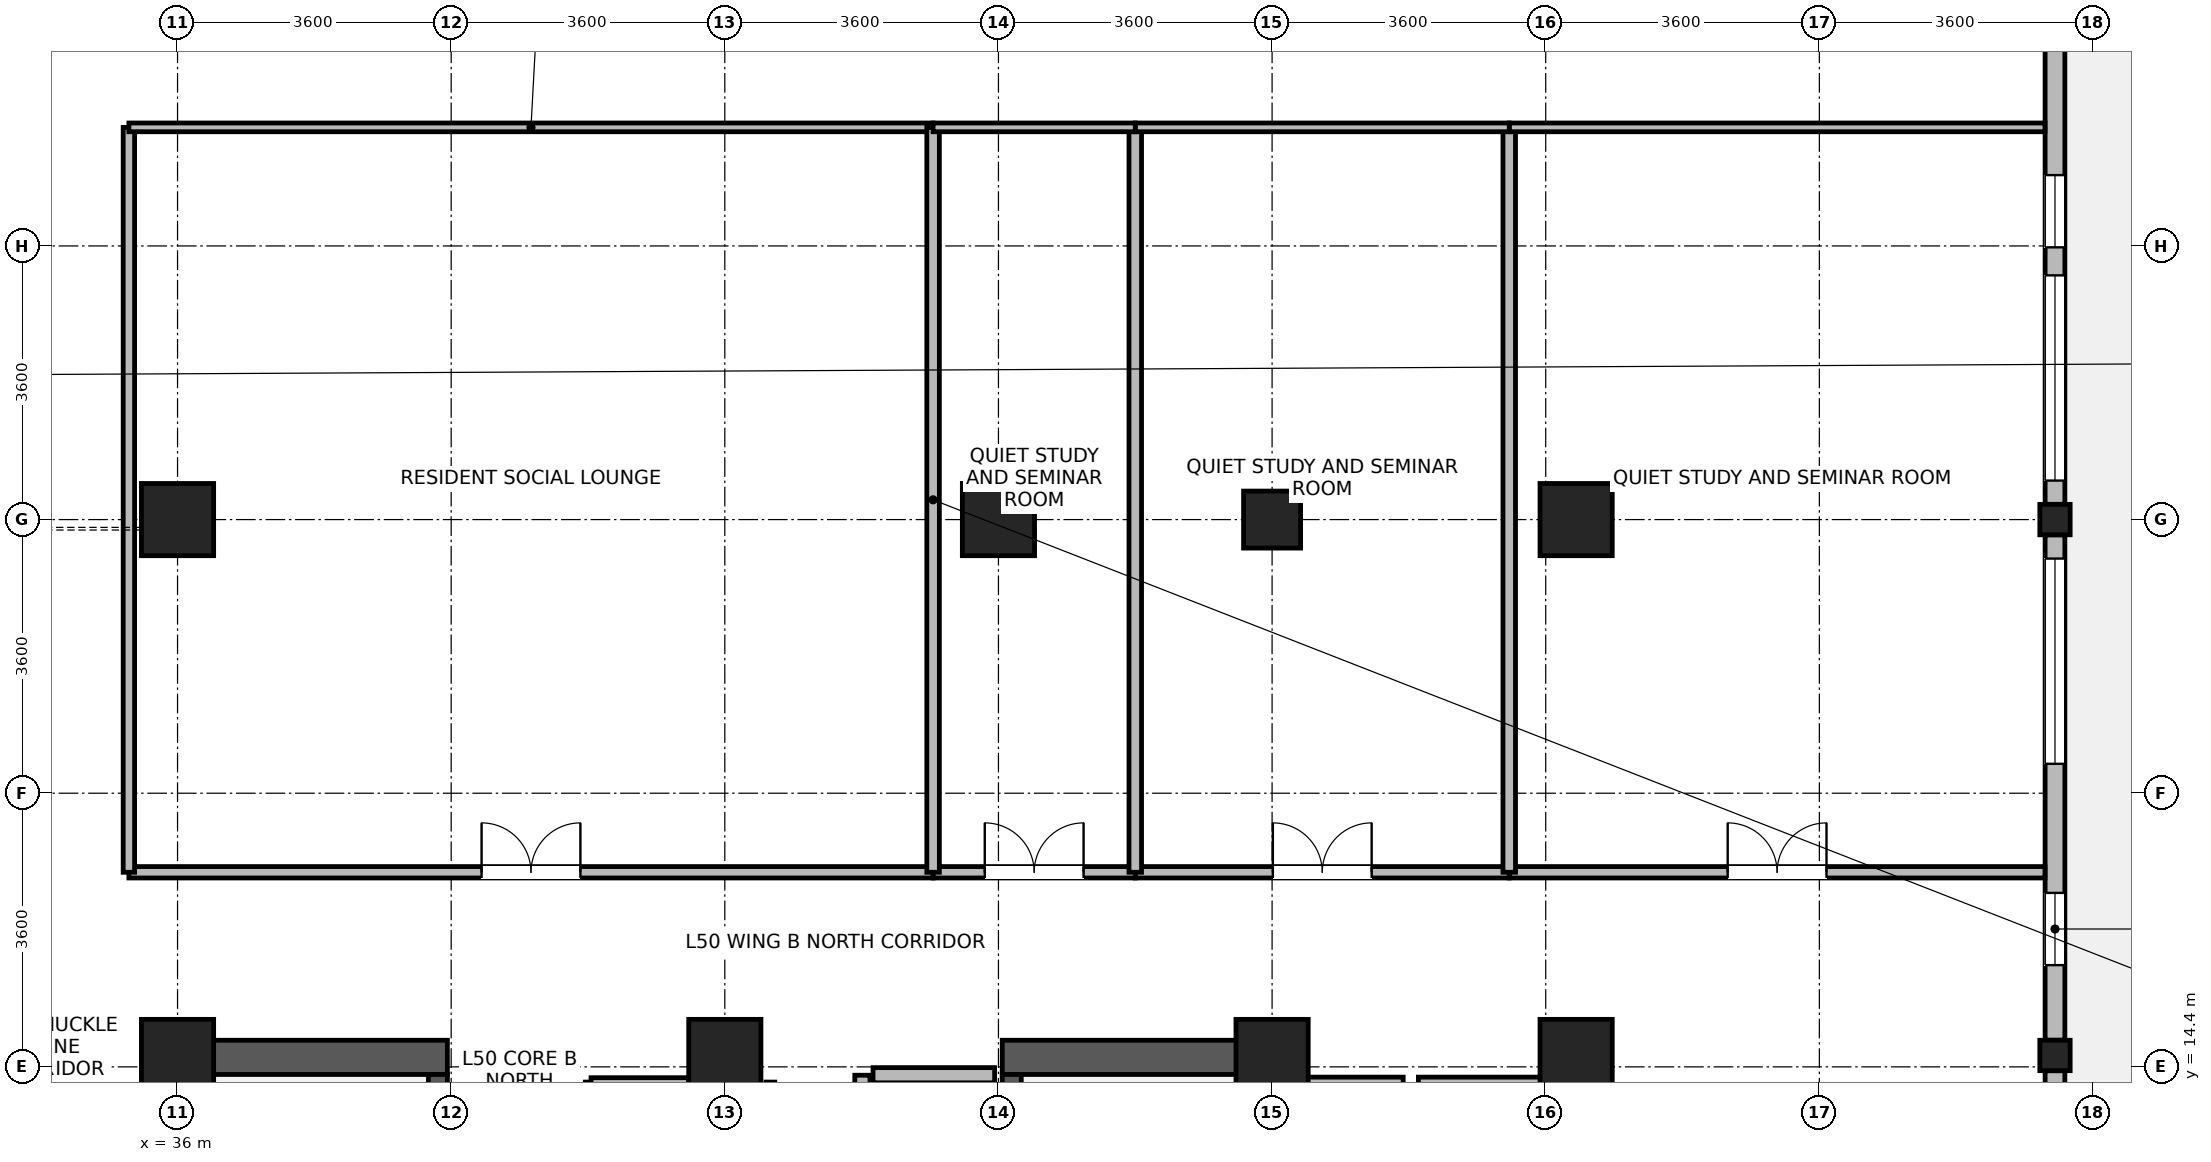
"""IFC4 building model, lengths in metres.
Left out: names, types, materials, properties, quantities, classifications, styles, units other than length and angle.
Written with IfcOpenShell. Run it as: python <this file> out.ifc"""

import sys

from ifc_helpers import new_model, si_unit, direction, frame, frame_2d, origin, origin_2d, place, context, subcontext, project, spatial, rectangle, i_section, extrude, source, transform, mapped, element, fill, save


model = new_model("IFC4")
c1 = context("Model", 3, precision=1e-05, world=origin(), true_north=direction((0.0, 1.0)))
c2 = subcontext(c1, "Body", "Model", "MODEL_VIEW")
j1 = project(units=[si_unit("LENGTHUNIT", "METRE"), si_unit("PLANEANGLEUNIT", "RADIAN")], contexts=[c1])
p1 = place(None, origin())
s1 = spatial("IfcSite", under=j1, at=p1, CompositionType="ELEMENT")
p2 = place(p1, origin())
s2 = spatial("IfcBuilding", under=s1, at=p2, CompositionType="ELEMENT")
p3 = place(p2, frame((0.0, 0.0, 197.2)))
s3 = spatial("IfcBuildingStorey", under=s2, at=p3, CompositionType="ELEMENT", Elevation=197.2)
for number, where, z_axis, x_axis in (
    (1, (36.125, 6.85, 0.0), (0.0, 0.0, 1.0), (0.0, 1.0, 0.0)),
    (2, (50.275, 6.85, 0.0), (0.0, 0.0, 1.0), (0.0, 1.0, 0.0)),
):
    element("IfcWall", number, at=place(p3, frame(where, z_axis=z_axis, x_axis=x_axis)), inside=s3, PredefinedType="SHEAR", context=c2, shape_type="SweptSolid", body=[
        extrude(rectangle(XDim=7.9, YDim=0.45, at=frame_2d((3.95, 0.0))), origin(), (0.0, 0.0, 1.0), 4.37),
    ])
for number, where, z_axis, x_axis in (
    (3, (36.35, 14.525, 0.0), (0.0, 0.0, 1.0), (1.0, 0.0, 0.0)),
    (4, (46.85, 14.525, 0.0), (0.0, 0.0, 1.0), (1.0, 0.0, 0.0)),
):
    element("IfcWall", number, at=place(p3, frame(where, z_axis=z_axis, x_axis=x_axis)), inside=s3, PredefinedType="SHEAR", context=c2, shape_type="SweptSolid", body=[
        extrude(rectangle(XDim=3.2, YDim=0.45, at=frame_2d((1.6, 0.0))), origin(), (0.0, 0.0, 1.0), 4.37),
    ])
p4 = place(p3, frame((39.425, 7.3, 0.0), z_axis=(0.0, 0.0, 1.0), x_axis=(0.0, 1.0, 0.0)))
e5 = element("IfcWall", 5, at=p4, inside=s3, PredefinedType="SHEAR", context=c2, shape_type="SweptSolid", body=[
    extrude(rectangle(XDim=7.0, YDim=0.25, at=frame_2d((3.5, 0.0))), origin(), (0.0, 0.0, 1.0), 4.37),
])
p5 = place(p4, frame((0.15, 0.0, 0.0)))
e6 = element("IfcOpeningElement", 6, at=p5, cuts=e5, PredefinedType="OPENING", context=c2, shape_type="SweptSolid", body=[
    extrude(rectangle(XDim=1.1, YDim=2.08, at=frame_2d((0.55, 1.04))), frame((0.0, 0.135, 0.0), z_axis=(0.0, -1.0, 0.0), x_axis=(1.0, 0.0, 0.0)), (0.0, 0.0, 1.0), 0.27),
])
p6 = place(p3, frame((46.975, 7.3, 0.0), z_axis=(0.0, 0.0, 1.0), x_axis=(0.0, 1.0, 0.0)))
e7 = element("IfcWall", 7, at=p6, inside=s3, PredefinedType="SHEAR", context=c2, shape_type="SweptSolid", body=[
    extrude(rectangle(XDim=7.0, YDim=0.25, at=frame_2d((3.5, 0.0))), origin(), (0.0, 0.0, 1.0), 4.37),
])
p7 = place(p6, frame((0.15, 0.0, 0.0)))
e8 = element("IfcOpeningElement", 8, at=p7, cuts=e7, PredefinedType="OPENING", context=c2, shape_type="SweptSolid", body=[
    extrude(rectangle(XDim=1.1, YDim=2.08, at=frame_2d((0.55, 1.04))), frame((0.0, 0.135, 0.0), z_axis=(0.0, -1.0, 0.0), x_axis=(1.0, 0.0, 0.0)), (0.0, 0.0, 1.0), 0.27),
])
m1 = source(origin(), c2, "Body", "SweptSolid", [
    extrude(rectangle(XDim=0.95, YDim=0.95, at=origin_2d()), origin(), (0.0, 0.0, 1.0), 4.6),
])
for number, where, z_axis, x_axis in (
    (9, (36.0, 21.6, 0.0), (0.0, 0.0, 1.0), (1.0, 0.0, 0.0)),
    (10, (46.8, 21.6, 0.0), (0.0, 0.0, 1.0), (1.0, 0.0, 0.0)),
    (11, (36.0, 14.55, 0.0), (0.0, 0.0, 1.0), (1.0, 0.0, 0.0)),
    (12, (43.2, 14.55, 0.0), (0.0, 0.0, 1.0), (1.0, 0.0, 0.0)),
    (13, (50.4, 14.55, 0.0), (0.0, 0.0, 1.0), (1.0, 0.0, 0.0)),
):
    element("IfcColumn", number, at=place(p3, frame(where, z_axis=z_axis, x_axis=x_axis)), inside=s3, PredefinedType="COLUMN", context=c2, shape_type="MappedRepresentation", body=[
        mapped(m1, transform((0.0, 0.0, 0.0), x_axis=(1.0, 0.0, 0.0), y_axis=(0.0, 1.0, 0.0), z_axis=(0.0, 0.0, 1.0), scale=1.0)),
    ])
m2 = source(origin(), c2, "Body", "SweptSolid", [
    extrude(rectangle(XDim=0.75, YDim=0.75, at=origin_2d()), origin(), (0.0, 0.0, 1.0), 4.6),
])
p8 = place(p3, frame((50.4, 21.6, 0.0), z_axis=(0.0, 0.0, 1.0), x_axis=(1.0, 0.0, 0.0)))
e14 = element("IfcColumn", 14, at=p8, inside=s3, PredefinedType="PILASTER", context=c2, shape_type="MappedRepresentation", body=[
    mapped(m2, transform((0.0, 0.0, 0.0), x_axis=(1.0, 0.0, 0.0), y_axis=(0.0, 1.0, 0.0), z_axis=(0.0, 0.0, 1.0), scale=1.0)),
])
for number, where, z_axis, x_axis in (
    (15, (54.4, 14.55, 0.0), (0.0, 0.0, 1.0), (1.0, 0.0, 0.0)),
    (16, (54.4, 21.6, 0.0), (0.0, 0.0, 1.0), (1.0, 0.0, 0.0)),
):
    element("IfcColumn", number, at=place(p3, frame(where, z_axis=z_axis, x_axis=x_axis)), inside=s3, PredefinedType="COLUMN", context=c2, shape_type="MappedRepresentation", body=[
        mapped(m1, transform((0.0, 0.0, 0.0), x_axis=(1.0, 0.0, 0.0), y_axis=(0.0, 1.0, 0.0), z_axis=(0.0, 0.0, 1.0), scale=1.0)),
    ])
m3 = source(origin(), c2, "Body", "SweptSolid", [
    extrude(i_section(OverallWidth=0.399, OverallDepth=0.4, WebThickness=0.017, FlangeThickness=0.023, FilletRadius=0.015, at=origin_2d()), origin(), (0.0, 0.0, 1.0), 4.6),
])
for number, where, z_axis, x_axis in (
    (17, (60.7, 14.55, 0.0), (0.0, 0.0, 1.0), (1.0, 0.0, 0.0)),
    (18, (60.7, 21.6, 0.0), (0.0, 0.0, 1.0), (1.0, 0.0, 0.0)),
):
    element("IfcColumn", number, at=place(p3, frame(where, z_axis=z_axis, x_axis=x_axis)), inside=s3, PredefinedType="COLUMN", context=c2, shape_type="MappedRepresentation", body=[
        mapped(m3, transform((0.0, 0.0, 0.0), x_axis=(1.0, 0.0, 0.0), y_axis=(0.0, 1.0, 0.0), z_axis=(0.0, 0.0, 1.0), scale=1.0)),
    ])
p9 = place(p3, frame((60.7, 14.349, 0.0), z_axis=(0.0, 0.0, 1.0), x_axis=(0.0, -1.0, 0.0)))
e19 = element("IfcWall", 19, at=p9, inside=s3, PredefinedType="STANDARD", context=c2, shape_type="SweptSolid", body=[
    extrude(rectangle(XDim=7.098, YDim=0.26, at=frame_2d((3.549, 0.0))), origin(), (0.0, 0.0, 1.0), 3.9),
])
p10 = place(p9, frame((2.799, 0.0, 0.0)))
e20 = element("IfcOpeningElement", 20, at=p10, cuts=e19, PredefinedType="OPENING", context=c2, shape_type="SweptSolid", body=[
    extrude(rectangle(XDim=1.5, YDim=2.15, at=frame_2d((0.75, 1.075))), frame((0.0, 0.14, 0.0), z_axis=(0.0, -1.0, 0.0), x_axis=(1.0, 0.0, 0.0)), (0.0, 0.0, 1.0), 0.28),
])
p11 = place(p3, frame((60.7, 21.399, 0.0), z_axis=(0.0, 0.0, 1.0), x_axis=(0.0, -1.0, 0.0)))
e21 = element("IfcWall", 21, at=p11, inside=s3, PredefinedType="STANDARD", context=c2, shape_type="SweptSolid", body=[
    extrude(rectangle(XDim=6.648, YDim=0.26, at=frame_2d((3.324, 0.0))), origin(), (0.0, 0.0, 1.0), 3.9),
])
p12 = place(p11, frame((0.312, 0.0, 0.85)))
e22 = element("IfcOpeningElement", 22, at=p12, cuts=e21, PredefinedType="OPENING", context=c2, shape_type="SweptSolid", body=[
    extrude(rectangle(XDim=2.7, YDim=2.05, at=frame_2d((1.35, 1.025))), frame((0.0, 0.14, 0.0), z_axis=(0.0, -1.0, 0.0), x_axis=(1.0, 0.0, 0.0)), (0.0, 0.0, 1.0), 0.28),
])
p13 = place(p11, frame((4.71, 0.0, 0.85)))
e23 = element("IfcOpeningElement", 23, at=p13, cuts=e21, PredefinedType="OPENING", context=c2, shape_type="SweptSolid", body=[
    extrude(rectangle(XDim=0.95, YDim=1.75, at=frame_2d((0.475, 0.875))), frame((0.0, 0.14, 0.0), z_axis=(0.0, -1.0, 0.0), x_axis=(1.0, 0.0, 0.0)), (0.0, 0.0, 1.0), 0.28),
])
p14 = place(p3, frame((60.7, 28.449, 0.0), z_axis=(0.0, 0.0, 1.0), x_axis=(0.0, -1.0, 0.0)))
e24 = element("IfcWall", 24, at=p14, inside=s3, PredefinedType="STANDARD", context=c2, shape_type="SweptSolid", body=[
    extrude(rectangle(XDim=6.648, YDim=0.26, at=frame_2d((3.324, 0.0))), origin(), (0.0, 0.0, 1.0), 3.9),
])
p15 = place(p14, frame((3.636, 0.0, 0.85)))
e25 = element("IfcOpeningElement", 25, at=p15, cuts=e24, PredefinedType="OPENING", context=c2, shape_type="SweptSolid", body=[
    extrude(rectangle(XDim=2.7, YDim=2.05, at=frame_2d((1.35, 1.025))), frame((0.0, 0.14, 0.0), z_axis=(0.0, -1.0, 0.0), x_axis=(1.0, 0.0, 0.0)), (0.0, 0.0, 1.0), 0.28),
])
p16 = place(p14, frame((2.317, 0.0, 0.85)))
e26 = element("IfcOpeningElement", 26, at=p16, cuts=e24, PredefinedType="OPENING", context=c2, shape_type="SweptSolid", body=[
    extrude(rectangle(XDim=0.95, YDim=1.75, at=frame_2d((0.475, 0.875))), frame((0.0, 0.14, 0.0), z_axis=(0.0, -1.0, 0.0), x_axis=(1.0, 0.0, 0.0)), (0.0, 0.0, 1.0), 0.28),
])
p17 = place(p3, frame((50.475, 14.165, 0.0), z_axis=(0.0, 0.0, 1.0), x_axis=(1.0, 0.0, 0.0)))
e27 = element("IfcWall", 27, at=p17, inside=s3, PredefinedType="PARTITIONING", context=c2, shape_type="SweptSolid", body=[
    extrude(rectangle(XDim=1.65, YDim=0.2, at=frame_2d((0.825, 0.0))), origin(), (0.0, 0.0, 1.0), 4.35),
])
p18 = place(p3, frame((52.325, 14.165, 0.0), z_axis=(0.0, 0.0, 1.0), x_axis=(1.0, 0.0, 0.0)))
e28 = element("IfcWall", 28, at=p18, inside=s3, PredefinedType="PARTITIONING", context=c2, shape_type="SweptSolid", body=[
    extrude(rectangle(XDim=1.65, YDim=0.2, at=frame_2d((0.825, 0.0))), origin(), (0.0, 0.0, 1.0), 4.35),
])
p19 = place(p3, frame((45.15, 14.29, 0.0), z_axis=(0.0, 0.0, 1.0), x_axis=(1.0, 0.0, 0.0)))
e29 = element("IfcWall", 29, at=p19, inside=s3, PredefinedType="PARTITIONING", context=c2, shape_type="SweptSolid", body=[
    extrude(rectangle(XDim=1.6, YDim=0.2, at=frame_2d((0.8, 0.0))), origin(), (0.0, 0.0, 1.0), 3.35),
])
p20 = place(p3, frame((45.01, 11.61, 0.0), z_axis=(0.0, 0.0, 1.0), x_axis=(0.0, 1.0, 0.0)))
e30 = element("IfcWall", 30, at=p20, inside=s3, PredefinedType="PARTITIONING", context=c2, shape_type="SweptSolid", body=[
    extrude(rectangle(XDim=2.68, YDim=0.2, at=frame_2d((1.34, 0.0))), origin(), (0.0, 0.0, 1.0), 4.35),
])
p21 = place(p3, frame((35.36, 16.96, 0.0), z_axis=(0.0, 0.0, 1.0), x_axis=(1.0, 0.0, 0.0)))
e31 = element("IfcWall", 31, at=p21, inside=s3, PredefinedType="PARTITIONING", context=c2, shape_type="SweptSolid", body=[
    extrude(rectangle(XDim=10.58, YDim=0.15, at=frame_2d((5.29, 0.0))), origin(), (0.0, 0.0, 1.0), 4.35),
])
p22 = place(p21, frame((4.64, 0.0, 0.0)))
e32 = element("IfcOpeningElement", 32, at=p22, cuts=e31, PredefinedType="OPENING", context=c2, shape_type="SweptSolid", body=[
    extrude(rectangle(XDim=1.3, YDim=2.12, at=frame_2d((0.65, 1.06))), frame((0.0, 0.085, 0.0), z_axis=(0.0, -1.0, 0.0), x_axis=(1.0, 0.0, 0.0)), (0.0, 0.0, 1.0), 0.17),
])
p23 = place(p3, frame((35.36, 16.96, 0.0), z_axis=(0.0, 0.0, 1.0), x_axis=(0.0, 1.0, 0.0)))
e33 = element("IfcWall", 33, at=p23, inside=s3, PredefinedType="PARTITIONING", context=c2, shape_type="SweptSolid", body=[
    extrude(rectangle(XDim=9.8, YDim=0.15, at=frame_2d((4.9, 0.0))), origin(), (0.0, 0.0, 1.0), 4.35),
])
p24 = place(p3, frame((53.52, 16.96, 0.0), z_axis=(0.0, 0.0, 1.0), x_axis=(1.0, 0.0, 0.0)))
e34 = element("IfcWall", 34, at=p24, inside=s3, PredefinedType="PARTITIONING", context=c2, shape_type="SweptSolid", body=[
    extrude(rectangle(XDim=7.048, YDim=0.15, at=frame_2d((3.524, 0.0))), origin(), (0.0, 0.0, 1.0), 4.35),
])
p25 = place(p24, frame((2.874, 0.0, 0.0)))
e35 = element("IfcOpeningElement", 35, at=p25, cuts=e34, PredefinedType="OPENING", context=c2, shape_type="SweptSolid", body=[
    extrude(rectangle(XDim=1.3, YDim=2.12, at=frame_2d((0.65, 1.06))), frame((0.0, 0.085, 0.0), z_axis=(0.0, -1.0, 0.0), x_axis=(1.0, 0.0, 0.0)), (0.0, 0.0, 1.0), 0.17),
])
p26 = place(p3, frame((48.6, 16.96, 0.0), z_axis=(0.0, 0.0, 1.0), x_axis=(1.0, 0.0, 0.0)))
e36 = element("IfcWall", 36, at=p26, inside=s3, PredefinedType="PARTITIONING", context=c2, shape_type="SweptSolid", body=[
    extrude(rectangle(XDim=4.92, YDim=0.15, at=frame_2d((2.46, 0.0))), origin(), (0.0, 0.0, 1.0), 4.35),
])
p27 = place(p26, frame((1.81, 0.0, 0.0)))
e37 = element("IfcOpeningElement", 37, at=p27, cuts=e36, PredefinedType="OPENING", context=c2, shape_type="SweptSolid", body=[
    extrude(rectangle(XDim=1.3, YDim=2.12, at=frame_2d((0.65, 1.06))), frame((0.0, 0.085, 0.0), z_axis=(0.0, -1.0, 0.0), x_axis=(1.0, 0.0, 0.0)), (0.0, 0.0, 1.0), 0.17),
])
p28 = place(p3, frame((45.94, 16.96, 0.0), z_axis=(0.0, 0.0, 1.0), x_axis=(1.0, 0.0, 0.0)))
e38 = element("IfcWall", 38, at=p28, inside=s3, PredefinedType="PARTITIONING", context=c2, shape_type="SweptSolid", body=[
    extrude(rectangle(XDim=2.66, YDim=0.15, at=frame_2d((1.33, 0.0))), origin(), (0.0, 0.0, 1.0), 4.35),
])
p29 = place(p28, frame((0.68, 0.0, 0.0)))
e39 = element("IfcOpeningElement", 39, at=p29, cuts=e38, PredefinedType="OPENING", context=c2, shape_type="SweptSolid", body=[
    extrude(rectangle(XDim=1.3, YDim=2.12, at=frame_2d((0.65, 1.06))), frame((0.0, 0.085, 0.0), z_axis=(0.0, -1.0, 0.0), x_axis=(1.0, 0.0, 0.0)), (0.0, 0.0, 1.0), 0.17),
])
p30 = place(p3, frame((35.36, 26.76, 0.0), z_axis=(0.0, 0.0, 1.0), x_axis=(1.0, 0.0, 0.0)))
e40 = element("IfcWall", 40, at=p30, inside=s3, PredefinedType="PARTITIONING", context=c2, shape_type="SweptSolid", body=[
    extrude(rectangle(XDim=10.58, YDim=0.115, at=frame_2d((5.29, 0.0))), origin(), (0.0, 0.0, 1.0), 4.35),
])
for number, where, z_axis, x_axis in (
    (41, (45.94, 16.96, 0.0), (0.0, 0.0, 1.0), (0.0, 1.0, 0.0)),
    (42, (48.6, 16.96, 0.0), (0.0, 0.0, 1.0), (0.0, 1.0, 0.0)),
    (43, (53.52, 16.96, 0.0), (0.0, 0.0, 1.0), (0.0, 1.0, 0.0)),
):
    element("IfcWall", number, at=place(p3, frame(where, z_axis=z_axis, x_axis=x_axis)), inside=s3, PredefinedType="PARTITIONING", context=c2, shape_type="SweptSolid", body=[
        extrude(rectangle(XDim=9.8, YDim=0.165, at=frame_2d((4.9, 0.0))), origin(), (0.0, 0.0, 1.0), 4.35),
    ])
p31 = place(p3, frame((53.52, 26.76, 0.0), z_axis=(0.0, 0.0, 1.0), x_axis=(1.0, 0.0, 0.0)))
e44 = element("IfcWall", 44, at=p31, inside=s3, PredefinedType="PARTITIONING", context=c2, shape_type="SweptSolid", body=[
    extrude(rectangle(XDim=7.048, YDim=0.115, at=frame_2d((3.524, 0.0))), origin(), (0.0, 0.0, 1.0), 4.35),
])
p32 = place(p3, frame((48.6, 26.76, 0.0), z_axis=(0.0, 0.0, 1.0), x_axis=(1.0, 0.0, 0.0)))
e45 = element("IfcWall", 45, at=p32, inside=s3, PredefinedType="PARTITIONING", context=c2, shape_type="SweptSolid", body=[
    extrude(rectangle(XDim=4.92, YDim=0.115, at=frame_2d((2.46, 0.0))), origin(), (0.0, 0.0, 1.0), 4.35),
])
p33 = place(p3, frame((45.94, 26.76, 0.0), z_axis=(0.0, 0.0, 1.0), x_axis=(1.0, 0.0, 0.0)))
e46 = element("IfcWall", 46, at=p33, inside=s3, PredefinedType="PARTITIONING", context=c2, shape_type="SweptSolid", body=[
    extrude(rectangle(XDim=2.66, YDim=0.115, at=frame_2d((1.33, 0.0))), origin(), (0.0, 0.0, 1.0), 4.35),
])
p34 = place(p3, frame((41.44, 14.2, 0.0), z_axis=(0.0, 0.0, 1.0), x_axis=(1.0, 0.0, 0.0)))
e47 = element("IfcWall", 47, at=p34, inside=s3, PredefinedType="PARTITIONING", context=c2, shape_type="SweptSolid", body=[
    extrude(rectangle(XDim=1.285, YDim=0.115, at=frame_2d((0.643, 0.0))), origin(), (0.0, 0.0, 1.0), 3.35),
])
p35 = place(p12, origin())
e48 = element("IfcWindow", 48, at=p35, inside=s3, PartitioningType="SINGLE_PANEL", PredefinedType="WINDOW", context=c2, shape_type="SweptSolid", body=[
    extrude(rectangle(XDim=2.7, YDim=2.05, at=frame_2d((1.35, 1.025))), frame((0.0, 0.03, 0.0), z_axis=(0.0, -1.0, 0.0), x_axis=(1.0, 0.0, 0.0)), (0.0, 0.0, 1.0), 0.06),
])
fill(e22, e48)
p36 = place(p13, origin())
e49 = element("IfcWindow", 49, at=p36, inside=s3, PartitioningType="SINGLE_PANEL", PredefinedType="WINDOW", context=c2, shape_type="SweptSolid", body=[
    extrude(rectangle(XDim=0.95, YDim=1.75, at=frame_2d((0.475, 0.875))), frame((0.0, 0.03, 0.0), z_axis=(0.0, -1.0, 0.0), x_axis=(1.0, 0.0, 0.0)), (0.0, 0.0, 1.0), 0.06),
])
fill(e23, e49)
p37 = place(p15, origin())
e50 = element("IfcWindow", 50, at=p37, inside=s3, PartitioningType="SINGLE_PANEL", PredefinedType="WINDOW", context=c2, shape_type="SweptSolid", body=[
    extrude(rectangle(XDim=2.7, YDim=2.05, at=frame_2d((1.35, 1.025))), frame((0.0, 0.03, 0.0), z_axis=(0.0, -1.0, 0.0), x_axis=(1.0, 0.0, 0.0)), (0.0, 0.0, 1.0), 0.06),
])
fill(e25, e50)
p38 = place(p16, origin())
e51 = element("IfcWindow", 51, at=p38, inside=s3, PartitioningType="SINGLE_PANEL", PredefinedType="WINDOW", context=c2, shape_type="SweptSolid", body=[
    extrude(rectangle(XDim=0.95, YDim=1.75, at=frame_2d((0.475, 0.875))), frame((0.0, 0.03, 0.0), z_axis=(0.0, -1.0, 0.0), x_axis=(1.0, 0.0, 0.0)), (0.0, 0.0, 1.0), 0.06),
])
fill(e26, e51)
p39 = place(p22, origin())
e52 = element("IfcDoor", 52, at=p39, inside=s3, OperationType="DOUBLE_DOOR_SINGLE_SWING", PredefinedType="DOOR", context=c2, shape_type="SweptSolid", body=[
    extrude(rectangle(XDim=1.3, YDim=2.12, at=frame_2d((0.65, 1.06))), frame((0.0, 0.025, 0.0), z_axis=(0.0, -1.0, 0.0), x_axis=(1.0, 0.0, 0.0)), (0.0, 0.0, 1.0), 0.05),
])
fill(e32, e52)
p40 = place(p25, origin())
e53 = element("IfcDoor", 53, at=p40, inside=s3, OperationType="DOUBLE_DOOR_SINGLE_SWING", PredefinedType="DOOR", context=c2, shape_type="SweptSolid", body=[
    extrude(rectangle(XDim=1.3, YDim=2.12, at=frame_2d((0.65, 1.06))), frame((0.0, 0.025, 0.0), z_axis=(0.0, -1.0, 0.0), x_axis=(1.0, 0.0, 0.0)), (0.0, 0.0, 1.0), 0.05),
])
fill(e35, e53)
p41 = place(p27, origin())
e54 = element("IfcDoor", 54, at=p41, inside=s3, OperationType="DOUBLE_DOOR_SINGLE_SWING", PredefinedType="DOOR", context=c2, shape_type="SweptSolid", body=[
    extrude(rectangle(XDim=1.3, YDim=2.12, at=frame_2d((0.65, 1.06))), frame((0.0, 0.025, 0.0), z_axis=(0.0, -1.0, 0.0), x_axis=(1.0, 0.0, 0.0)), (0.0, 0.0, 1.0), 0.05),
])
fill(e37, e54)
p42 = place(p29, origin())
e55 = element("IfcDoor", 55, at=p42, inside=s3, OperationType="DOUBLE_DOOR_SINGLE_SWING", PredefinedType="DOOR", context=c2, shape_type="SweptSolid", body=[
    extrude(rectangle(XDim=1.3, YDim=2.12, at=frame_2d((0.65, 1.06))), frame((0.0, 0.025, 0.0), z_axis=(0.0, -1.0, 0.0), x_axis=(1.0, 0.0, 0.0)), (0.0, 0.0, 1.0), 0.05),
])
fill(e39, e55)
save(model, sys.argv[1])
